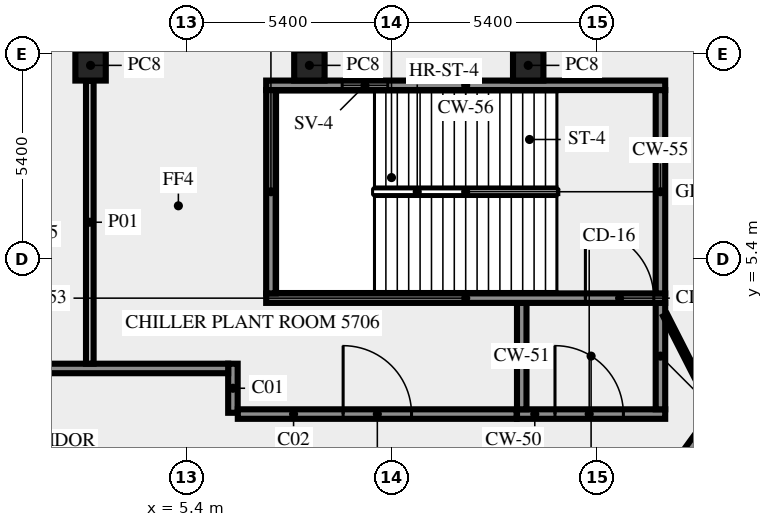
"""IFC4 building model, lengths in metres.
Left out: names, types, materials, properties, quantities, classifications, styles, units other than length and angle.
Written with IfcOpenShell. Run it as: python <this file> out.ifc"""

import sys

from ifc_helpers import new_model, si_unit, direction, frame, frame_2d, origin, origin_2d, place, context, subcontext, project, spatial, rectangle, extrude, element, fill, save


model = new_model("IFC4")
c1 = context("Model", 3, precision=1e-05, world=origin(), true_north=direction((0.0, 1.0)))
c2 = subcontext(c1, "Body", "Model", "MODEL_VIEW")
j1 = project(units=[si_unit("LENGTHUNIT", "METRE"), si_unit("PLANEANGLEUNIT", "RADIAN")], contexts=[c1])
p1 = place(None, origin())
s1 = spatial("IfcSite", under=j1, at=p1, CompositionType="ELEMENT")
p2 = place(p1, origin())
s2 = spatial("IfcBuilding", under=s1, at=p2, CompositionType="ELEMENT")
p3 = place(p2, frame((0.0, 0.0, 242.0)))
s3 = spatial("IfcBuildingStorey", under=s2, at=p3, CompositionType="ELEMENT", Elevation=242.0)
for number, where, z_axis, x_axis in (
    (1, (14.395, 10.5, 0.0), (0.0, 0.0, 1.0), (-1.0, 0.0, 0.0)),
    (2, (8.637, 10.5, 0.0), (0.0, 0.0, 1.0), (-1.0, 0.0, 0.0)),
    (3, (2.879, 10.5, 0.0), (0.0, 0.0, 1.0), (-1.0, 0.0, 0.0)),
):
    element("IfcColumn", number, at=place(p3, frame(where, z_axis=z_axis, x_axis=x_axis)), inside=s3, PredefinedType="COLUMN", context=c2, shape_type="SweptSolid", body=[
        extrude(rectangle(XDim=0.8, YDim=0.8, at=origin_2d()), origin(), (0.0, 0.0, 1.0), 5.6),
    ])
p4 = place(p3, frame((14.1, 1.325, 0.0), z_axis=(0.0, 0.0, 1.0), x_axis=(1.0, 0.0, 0.0)))
e4 = element("IfcWall", 4, at=p4, inside=s3, PredefinedType="SHEAR", context=c2, shape_type="SweptSolid", body=[
    extrude(rectangle(XDim=3.9, YDim=0.25, at=frame_2d((1.95, 0.0))), origin(), (0.0, 0.0, 1.0), 5.6),
])
p5 = place(p4, frame((1.0, 0.0, 0.0)))
e5 = element("IfcOpeningElement", 5, at=p5, cuts=e4, PredefinedType="OPENING", context=c2, shape_type="SweptSolid", body=[
    extrude(rectangle(XDim=1.8, YDim=2.1, at=frame_2d((0.9, 1.05))), frame((0.0, 0.135, 0.0), z_axis=(0.0, -1.0, 0.0), x_axis=(1.0, 0.0, 0.0)), (0.0, 0.0, 1.0), 0.27),
])
for number, where, z_axis, x_axis in (
    (6, (14.225, 1.45, 0.0), (0.0, 0.0, 1.0), (0.0, 1.0, 0.0)),
    (7, (17.875, 1.45, 0.0), (0.0, 0.0, 1.0), (0.0, 1.0, 0.0)),
):
    element("IfcWall", number, at=place(p3, frame(where, z_axis=z_axis, x_axis=x_axis)), inside=s3, PredefinedType="SHEAR", context=c2, shape_type="SweptSolid", body=[
        extrude(rectangle(XDim=2.8, YDim=0.25, at=frame_2d((1.4, 0.0))), origin(), (0.0, 0.0, 1.0), 5.6),
    ])
p6 = place(p3, frame((7.5, 4.375, 0.0), z_axis=(0.0, 0.0, 1.0), x_axis=(1.0, 0.0, 0.0)))
e8 = element("IfcWall", 8, at=p6, inside=s3, PredefinedType="SHEAR", context=c2, shape_type="SweptSolid", body=[
    extrude(rectangle(XDim=10.5, YDim=0.25, at=frame_2d((5.25, 0.0))), origin(), (0.0, 0.0, 1.0), 5.6),
])
p7 = place(p6, frame((8.4, 0.0, 0.0)))
e9 = element("IfcOpeningElement", 9, at=p7, cuts=e8, PredefinedType="OPENING", context=c2, shape_type="SweptSolid", body=[
    extrude(rectangle(XDim=1.8, YDim=2.1, at=frame_2d((0.9, 1.05))), frame((0.0, 0.135, 0.0), z_axis=(0.0, -1.0, 0.0), x_axis=(1.0, 0.0, 0.0)), (0.0, 0.0, 1.0), 0.27),
])
for number, where, z_axis, x_axis in (
    (10, (7.625, 4.5, 0.0), (0.0, 0.0, 1.0), (0.0, 1.0, 0.0)),
    (11, (17.875, 4.5, 0.0), (0.0, 0.0, 1.0), (0.0, 1.0, 0.0)),
):
    element("IfcWall", number, at=place(p3, frame(where, z_axis=z_axis, x_axis=x_axis)), inside=s3, PredefinedType="SHEAR", context=c2, shape_type="SweptSolid", body=[
        extrude(rectangle(XDim=5.35, YDim=0.25, at=frame_2d((2.675, 0.0))), origin(), (0.0, 0.0, 1.0), 5.6),
    ])
p8 = place(p3, frame((7.5, 9.975, 0.0), z_axis=(0.0, 0.0, 1.0), x_axis=(1.0, 0.0, 0.0)))
e12 = element("IfcWall", 12, at=p8, inside=s3, PredefinedType="SHEAR", context=c2, shape_type="SweptSolid", body=[
    extrude(rectangle(XDim=10.5, YDim=0.25, at=frame_2d((5.25, 0.0))), origin(), (0.0, 0.0, 1.0), 5.6),
])
p9 = place(p8, frame((2.0, 0.0, 1.0)))
e13 = element("IfcOpeningElement", 13, at=p9, cuts=e12, PredefinedType="OPENING", context=c2, shape_type="SweptSolid", body=[
    extrude(rectangle(XDim=1.2, YDim=1.2, at=frame_2d((0.6, 0.6))), frame((0.0, 0.135, 0.0), z_axis=(0.0, -1.0, 0.0), x_axis=(1.0, 0.0, 0.0)), (0.0, 0.0, 1.0), 0.27),
])
p10 = place(p3, frame((6.625, 2.65, 0.0), z_axis=(0.0, 0.0, 1.0), x_axis=(0.0, -1.0, 0.0)))
e14 = element("IfcWall", 14, at=p10, inside=s3, PredefinedType="SOLIDWALL", context=c2, shape_type="SweptSolid", body=[
    extrude(rectangle(XDim=1.291, YDim=0.25, at=frame_2d((0.646, 0.0))), origin(), (0.0, 0.0, 1.0), 5.6),
])
p11 = place(p3, frame((6.754, 1.325, 0.0), z_axis=(0.0, 0.0, 1.0), x_axis=(1.0, 0.0, 0.0)))
e15 = element("IfcWall", 15, at=p11, inside=s3, PredefinedType="SOLIDWALL", context=c2, shape_type="SweptSolid", body=[
    extrude(rectangle(XDim=7.336, YDim=0.25, at=frame_2d((3.668, 0.0))), origin(), (0.0, 0.0, 1.0), 5.6),
])
p12 = place(p11, frame((2.771, 0.0, 0.0)))
e16 = element("IfcOpeningElement", 16, at=p12, cuts=e15, PredefinedType="OPENING", context=c2, shape_type="SweptSolid", body=[
    extrude(rectangle(XDim=1.8, YDim=2.1, at=frame_2d((0.9, 1.05))), frame((0.0, 0.135, 0.0), z_axis=(0.0, -1.0, 0.0), x_axis=(1.0, 0.0, 0.0)), (0.0, 0.0, 1.0), 0.27),
])
p13 = place(p3, frame((17.545, -1.125, 0.0), z_axis=(0.0, 0.0, 1.0), x_axis=(0.587789755823, 0.80901372235, 0.0)))
e17 = element("IfcWall", 17, at=p13, inside=s3, PredefinedType="SOLIDWALL", context=c2, shape_type="SweptSolid", body=[
    extrude(rectangle(XDim=23.645, YDim=0.25, at=frame_2d((11.822, 0.0))), origin(), (0.0, 0.0, 1.0), 5.6),
])
p14 = place(p13, frame((21.603, 0.0, 0.0)))
e18 = element("IfcOpeningElement", 18, at=p14, cuts=e17, PredefinedType="OPENING", context=c2, shape_type="SweptSolid", body=[
    extrude(rectangle(XDim=0.9, YDim=2.1, at=frame_2d((0.45, 1.05))), frame((0.0, 0.135, 0.0), z_axis=(0.0, -1.0, 0.0), x_axis=(1.0, 0.0, 0.0)), (0.0, 0.0, 1.0), 0.27),
])
p15 = place(p3, frame((-4.5, 2.525, 0.0), z_axis=(0.0, 0.0, 1.0), x_axis=(1.0, 0.0, 0.0)))
e19 = element("IfcWall", 19, at=p15, inside=s3, PredefinedType="SOLIDWALL", context=c2, shape_type="SweptSolid", body=[
    extrude(rectangle(XDim=11.0, YDim=0.25, at=frame_2d((5.5, 0.0))), origin(), (0.0, 0.0, 1.0), 5.6),
])
p16 = place(p3, frame((2.859, 2.65, 0.0), z_axis=(0.0, 0.0, 1.0), x_axis=(0.0, 1.0, 0.0)))
e20 = element("IfcWall", 20, at=p16, inside=s3, PredefinedType="SOLIDWALL", context=c2, shape_type="SweptSolid", body=[
    extrude(rectangle(XDim=7.445, YDim=0.2, at=frame_2d((3.723, 0.0))), origin(), (0.0, 0.0, 1.0), 5.6),
])
p17 = place(p3, frame((18.0, 3.925, 0.0), z_axis=(0.0, 0.0, 1.0), x_axis=(0.453950796792, -0.891026752736, 0.0)))
e21 = element("IfcWall", 21, at=p17, inside=s3, PredefinedType="PARTITIONING", context=c2, shape_type="SweptSolid", body=[
    extrude(rectangle(XDim=2.778, YDim=0.12, at=frame_2d((1.389, 0.0))), origin(), (0.0, 0.0, 1.0), 5.6),
])
p18 = place(p5, origin())
e22 = element("IfcDoor", 22, at=p18, inside=s3, OperationType="DOUBLE_DOOR_SINGLE_SWING", PredefinedType="DOOR", context=c2, shape_type="SweptSolid", body=[
    extrude(rectangle(XDim=1.8, YDim=2.1, at=frame_2d((0.9, 1.05))), frame((0.0, 0.025, 0.0), z_axis=(0.0, -1.0, 0.0), x_axis=(1.0, 0.0, 0.0)), (0.0, 0.0, 1.0), 0.05),
])
fill(e5, e22)
p19 = place(p7, origin())
e23 = element("IfcDoor", 23, at=p19, inside=s3, OperationType="DOUBLE_DOOR_SINGLE_SWING", PredefinedType="DOOR", context=c2, shape_type="SweptSolid", body=[
    extrude(rectangle(XDim=1.8, YDim=2.1, at=frame_2d((0.9, 1.05))), frame((0.0, 0.025, 0.0), z_axis=(0.0, -1.0, 0.0), x_axis=(1.0, 0.0, 0.0)), (0.0, 0.0, 1.0), 0.05),
])
fill(e9, e23)
p20 = place(p9, origin())
e24 = element("IfcWindow", 24, at=p20, inside=s3, PartitioningType="SINGLE_PANEL", PredefinedType="WINDOW", context=c2, shape_type="SweptSolid", body=[
    extrude(rectangle(XDim=1.2, YDim=1.2, at=frame_2d((0.6, 0.6))), frame((0.0, 0.03, 0.0), z_axis=(0.0, -1.0, 0.0), x_axis=(1.0, 0.0, 0.0)), (0.0, 0.0, 1.0), 0.06),
])
fill(e13, e24)
p21 = place(p12, origin())
e25 = element("IfcDoor", 25, at=p21, inside=s3, OperationType="DOUBLE_DOOR_SINGLE_SWING", PredefinedType="DOOR", context=c2, shape_type="SweptSolid", body=[
    extrude(rectangle(XDim=1.8, YDim=2.1, at=frame_2d((0.9, 1.05))), frame((0.0, 0.025, 0.0), z_axis=(0.0, -1.0, 0.0), x_axis=(1.0, 0.0, 0.0)), (0.0, 0.0, 1.0), 0.05),
])
fill(e16, e25)
save(model, sys.argv[1])
